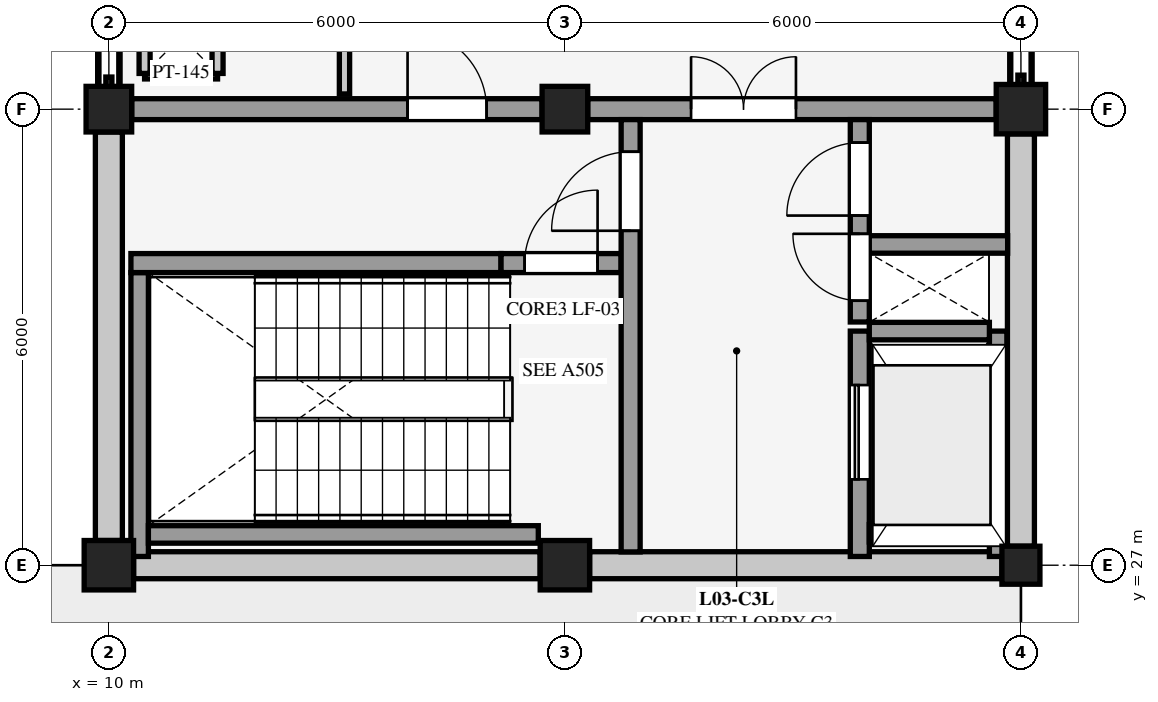
"""IFC4 building model, lengths in metres.
Left out: names, types, materials, properties, quantities, classifications, styles, units other than length and angle.
Written with IfcOpenShell. Run it as: python <this file> out.ifc"""

import sys

from ifc_helpers import new_model, si_unit, direction, frame, frame_2d, origin, origin_2d, place, context, subcontext, project, spatial, rectangle, extrude, element, fill, save


model = new_model("IFC4")
c1 = context("Model", 3, precision=1e-05, world=origin(), true_north=direction((0.0, 1.0)))
c2 = subcontext(c1, "Body", "Model", "MODEL_VIEW")
j1 = project(units=[si_unit("LENGTHUNIT", "METRE"), si_unit("PLANEANGLEUNIT", "RADIAN")], contexts=[c1])
p1 = place(None, origin())
s1 = spatial("IfcSite", under=j1, at=p1, CompositionType="ELEMENT")
p2 = place(p1, origin())
s2 = spatial("IfcBuilding", under=s1, at=p2, CompositionType="ELEMENT")
p3 = place(p2, frame((0.0, 0.0, 9.0)))
s3 = spatial("IfcBuildingStorey", under=s2, at=p3, CompositionType="ELEMENT", Elevation=9.0)
p4 = place(p3, frame((10.0, 27.0, 0.0), z_axis=(0.0, 0.0, 1.0), x_axis=(1.0, 0.0, 0.0)))
e1 = element("IfcColumn", 1, at=p4, inside=s3, PredefinedType="COLUMN", context=c2, shape_type="SweptSolid", body=[
    extrude(rectangle(XDim=0.65, YDim=0.65, at=origin_2d()), origin(), (0.0, 0.0, 1.0), 4.5),
])
p5 = place(p3, frame((10.0, 33.0, 0.0), z_axis=(0.0, 0.0, 1.0), x_axis=(1.0, 0.0, 0.0)))
e2 = element("IfcColumn", 2, at=p5, inside=s3, PredefinedType="COLUMN", context=c2, shape_type="SweptSolid", body=[
    extrude(rectangle(XDim=0.6, YDim=0.6, at=origin_2d()), origin(), (0.0, 0.0, 1.0), 4.5),
])
p6 = place(p3, frame((16.0, 27.0, 0.0), z_axis=(0.0, 0.0, 1.0), x_axis=(1.0, 0.0, 0.0)))
e3 = element("IfcColumn", 3, at=p6, inside=s3, PredefinedType="COLUMN", context=c2, shape_type="SweptSolid", body=[
    extrude(rectangle(XDim=0.65, YDim=0.65, at=origin_2d()), origin(), (0.0, 0.0, 1.0), 4.5),
])
p7 = place(p3, frame((16.0, 33.0, 0.0), z_axis=(0.0, 0.0, 1.0), x_axis=(1.0, 0.0, 0.0)))
e4 = element("IfcColumn", 4, at=p7, inside=s3, PredefinedType="COLUMN", context=c2, shape_type="SweptSolid", body=[
    extrude(rectangle(XDim=0.6, YDim=0.6, at=origin_2d()), origin(), (0.0, 0.0, 1.0), 4.5),
])
p8 = place(p3, frame((22.0, 27.0, 0.0), z_axis=(0.0, 0.0, 1.0), x_axis=(1.0, 0.0, 0.0)))
e5 = element("IfcColumn", 5, at=p8, inside=s3, PredefinedType="COLUMN", context=c2, shape_type="SweptSolid", body=[
    extrude(rectangle(XDim=0.5, YDim=0.5, at=origin_2d()), origin(), (0.0, 0.0, 1.0), 4.5),
])
p9 = place(p3, frame((22.0, 33.0, 0.0), z_axis=(0.0, 0.0, 1.0), x_axis=(1.0, 0.0, 0.0)))
e6 = element("IfcColumn", 6, at=p9, inside=s3, PredefinedType="COLUMN", context=c2, shape_type="SweptSolid", body=[
    extrude(rectangle(XDim=0.65, YDim=0.65, at=origin_2d()), origin(), (0.0, 0.0, 1.0), 4.5),
])
p10 = place(p3, frame((15.675, 27.0, 0.0), z_axis=(0.0, 0.0, 1.0), x_axis=(-1.0, 0.0, 0.0)))
e7 = element("IfcWall", 7, at=p10, inside=s3, PredefinedType="SOLIDWALL", context=c2, shape_type="SweptSolid", body=[
    extrude(rectangle(XDim=5.35, YDim=0.355, at=frame_2d((2.675, 0.0))), origin(), (0.0, 0.0, 1.0), 4.034),
])
p11 = place(p3, frame((21.75, 27.0, 0.0), z_axis=(0.0, 0.0, 1.0), x_axis=(-1.0, 0.0, 0.0)))
e8 = element("IfcWall", 8, at=p11, inside=s3, PredefinedType="SOLIDWALL", context=c2, shape_type="SweptSolid", body=[
    extrude(rectangle(XDim=5.425, YDim=0.355, at=frame_2d((2.712, 0.0))), origin(), (0.0, 0.0, 1.0), 4.048),
])
p12 = place(p3, frame((10.0, 27.325, 0.0), z_axis=(0.0, 0.0, 1.0), x_axis=(0.0, 1.0, 0.0)))
e9 = element("IfcWall", 9, at=p12, inside=s3, PredefinedType="SOLIDWALL", context=c2, shape_type="SweptSolid", body=[
    extrude(rectangle(XDim=5.375, YDim=0.355, at=frame_2d((2.688, 0.0))), origin(), (0.0, 0.0, 1.0), 3.893),
])
p13 = place(p3, frame((22.0, 32.675, 0.0), z_axis=(0.0, 0.0, 1.0), x_axis=(0.0, -1.0, 0.0)))
e10 = element("IfcWall", 10, at=p13, inside=s3, PredefinedType="SOLIDWALL", context=c2, shape_type="SweptSolid", body=[
    extrude(rectangle(XDim=5.425, YDim=0.355, at=frame_2d((2.712, 0.0))), origin(), (0.0, 0.0, 1.0), 3.893),
])
p14 = place(p3, frame((10.0, 33.3, 0.0), z_axis=(0.0, 0.0, 1.0), x_axis=(0.0, 1.0, 0.0)))
e11 = element("IfcWall", 11, at=p14, inside=s3, PredefinedType="SOLIDWALL", context=c2, shape_type="SweptSolid", body=[
    extrude(rectangle(XDim=5.425, YDim=0.295, at=frame_2d((2.712, 0.0))), origin(), (0.0, 0.0, 1.0), 0.31),
])
p15 = place(p3, frame((22.0, 38.7, 0.0), z_axis=(0.0, 0.0, 1.0), x_axis=(0.0, -1.0, 0.0)))
e12 = element("IfcWall", 12, at=p15, inside=s3, PredefinedType="SOLIDWALL", context=c2, shape_type="SweptSolid", body=[
    extrude(rectangle(XDim=5.375, YDim=0.295, at=frame_2d((2.688, 0.0))), origin(), (0.0, 0.0, 1.0), 0.36),
])
for number, where, z_axis, x_axis in (
    (13, (10.47, 33.47, 0.0), (0.0, 0.0, 1.0), (1.0, 0.0, 0.0)),
    (14, (11.43, 33.47, 0.0), (0.0, 0.0, 1.0), (0.0, 1.0, 0.0)),
    (15, (10.47, 34.43, 0.0), (0.0, 0.0, 1.0), (0.0, -1.0, 0.0)),
):
    element("IfcWall", number, at=place(p3, frame(where, z_axis=z_axis, x_axis=x_axis)), inside=s3, PredefinedType="PARTITIONING", context=c2, shape_type="SweptSolid", body=[
        extrude(rectangle(XDim=0.96, YDim=0.145, at=frame_2d((0.48, 0.0))), origin(), (0.0, 0.0, 1.0), 4.3),
    ])
p16 = place(p3, frame((10.3, 33.0, 0.0), z_axis=(0.0, 0.0, 1.0), x_axis=(1.0, 0.0, 0.0)))
e16 = element("IfcWall", 16, at=p16, inside=s3, PredefinedType="SHEAR", context=c2, shape_type="SweptSolid", body=[
    extrude(rectangle(XDim=5.4, YDim=0.275, at=frame_2d((2.7, 0.0))), origin(), (0.0, 0.0, 1.0), 4.3),
])
p17 = place(p16, frame((3.63, 0.0, 0.0)))
e17 = element("IfcOpeningElement", 17, at=p17, cuts=e16, PredefinedType="OPENING", context=c2, shape_type="SweptSolid", body=[
    extrude(rectangle(XDim=1.04, YDim=2.14, at=frame_2d((0.52, 1.07))), frame((0.0, 0.147, 0.0), z_axis=(0.0, -1.0, 0.0), x_axis=(1.0, 0.0, 0.0)), (0.0, 0.0, 1.0), 0.295),
])
p18 = place(p3, frame((16.3, 33.0, 0.0), z_axis=(0.0, 0.0, 1.0), x_axis=(1.0, 0.0, 0.0)))
e18 = element("IfcWall", 18, at=p18, inside=s3, PredefinedType="SHEAR", context=c2, shape_type="SweptSolid", body=[
    extrude(rectangle(XDim=5.375, YDim=0.275, at=frame_2d((2.688, 0.0))), origin(), (0.0, 0.0, 1.0), 4.3),
])
p19 = place(p18, frame((1.36, 0.0, 0.0)))
e19 = element("IfcOpeningElement", 19, at=p19, cuts=e18, PredefinedType="OPENING", context=c2, shape_type="SweptSolid", body=[
    extrude(rectangle(XDim=1.38, YDim=2.16, at=frame_2d((0.69, 1.08))), frame((0.0, 0.147, 0.0), z_axis=(0.0, -1.0, 0.0), x_axis=(1.0, 0.0, 0.0)), (0.0, 0.0, 1.0), 0.295),
])
p20 = place(p3, frame((10.405, 27.115, 0.0), z_axis=(0.0, 0.0, 1.0), x_axis=(0.0, 1.0, 0.0)))
e20 = element("IfcWall", 20, at=p20, inside=s3, PredefinedType="SHEAR", context=c2, shape_type="SweptSolid", body=[
    extrude(rectangle(XDim=3.735, YDim=0.23, at=frame_2d((1.868, 0.0))), origin(), (0.0, 0.0, 1.0), 4.5),
])
p21 = place(p3, frame((10.52, 27.405, 0.0), z_axis=(0.0, 0.0, 1.0), x_axis=(1.0, 0.0, 0.0)))
e21 = element("IfcWall", 21, at=p21, inside=s3, PredefinedType="SHEAR", context=c2, shape_type="SweptSolid", body=[
    extrude(rectangle(XDim=5.13, YDim=0.23, at=frame_2d((2.565, 0.0))), origin(), (0.0, 0.0, 1.0), 4.5),
])
p22 = place(p3, frame((10.29, 30.975, 0.0), z_axis=(0.0, 0.0, 1.0), x_axis=(1.0, 0.0, 0.0)))
e22 = element("IfcWall", 22, at=p22, inside=s3, PredefinedType="SHEAR", context=c2, shape_type="SweptSolid", body=[
    extrude(rectangle(XDim=4.87, YDim=0.25, at=frame_2d((2.435, 0.0))), origin(), (0.0, 0.0, 1.0), 4.5),
])
p23 = place(p3, frame((15.16, 30.975, 0.0), z_axis=(0.0, 0.0, 1.0), x_axis=(1.0, 0.0, 0.0)))
e23 = element("IfcWall", 23, at=p23, inside=s3, PredefinedType="SHEAR", context=c2, shape_type="SweptSolid", body=[
    extrude(rectangle(XDim=1.58, YDim=0.25, at=frame_2d((0.79, 0.0))), origin(), (0.0, 0.0, 1.0), 4.3),
])
p24 = place(p23, frame((0.31, 0.0, 0.0)))
e24 = element("IfcOpeningElement", 24, at=p24, cuts=e23, PredefinedType="OPENING", context=c2, shape_type="SweptSolid", body=[
    extrude(rectangle(XDim=0.96, YDim=2.12, at=frame_2d((0.48, 1.06))), frame((0.0, 0.135, 0.0), z_axis=(0.0, -1.0, 0.0), x_axis=(1.0, 0.0, 0.0)), (0.0, 0.0, 1.0), 0.27),
])
p25 = place(p3, frame((16.865, 27.175, 0.0), z_axis=(0.0, 0.0, 1.0), x_axis=(0.0, 1.0, 0.0)))
e25 = element("IfcWall", 25, at=p25, inside=s3, PredefinedType="SHEAR", context=c2, shape_type="SweptSolid", body=[
    extrude(rectangle(XDim=5.688, YDim=0.25, at=frame_2d((2.844, 0.0))), origin(), (0.0, 0.0, 1.0), 4.3),
])
p26 = place(p25, frame((4.225, 0.0, 0.0)))
e26 = element("IfcOpeningElement", 26, at=p26, cuts=e25, PredefinedType="OPENING", context=c2, shape_type="SweptSolid", body=[
    extrude(rectangle(XDim=1.04, YDim=2.14, at=frame_2d((0.52, 1.07))), frame((0.0, 0.135, 0.0), z_axis=(0.0, -1.0, 0.0), x_axis=(1.0, 0.0, 0.0)), (0.0, 0.0, 1.0), 0.27),
])
p27 = place(p3, frame((19.88, 27.115, 0.0), z_axis=(0.0, 0.0, 1.0), x_axis=(0.0, 1.0, 0.0)))
e27 = element("IfcWall", 27, at=p27, inside=s3, PredefinedType="SHEAR", context=c2, shape_type="SweptSolid", body=[
    extrude(rectangle(XDim=2.965, YDim=0.25, at=frame_2d((1.482, 0.0))), origin(), (0.0, 0.0, 1.0), 4.5),
])
p28 = place(p27, frame((1.015, 0.0, 0.0)))
e28 = element("IfcOpeningElement", 28, at=p28, cuts=e27, PredefinedType="OPENING", context=c2, shape_type="SweptSolid", body=[
    extrude(rectangle(XDim=1.24, YDim=2.2, at=frame_2d((0.62, 1.1))), frame((0.0, 0.135, 0.0), z_axis=(0.0, -1.0, 0.0), x_axis=(1.0, 0.0, 0.0)), (0.0, 0.0, 1.0), 0.27),
])
p29 = place(p3, frame((20.005, 27.42, 0.0), z_axis=(0.0, 0.0, 1.0), x_axis=(1.0, 0.0, 0.0)))
e29 = element("IfcWall", 29, at=p29, inside=s3, PredefinedType="SHEAR", context=c2, shape_type="SweptSolid", body=[
    extrude(rectangle(XDim=1.58, YDim=0.23, at=frame_2d((0.79, 0.0))), origin(), (0.0, 0.0, 1.0), 4.5),
])
p30 = place(p3, frame((21.7, 27.115, 0.0), z_axis=(0.0, 0.0, 1.0), x_axis=(0.0, 1.0, 0.0)))
e30 = element("IfcWall", 30, at=p30, inside=s3, PredefinedType="SHEAR", context=c2, shape_type="SweptSolid", body=[
    extrude(rectangle(XDim=2.965, YDim=0.23, at=frame_2d((1.482, 0.0))), origin(), (0.0, 0.0, 1.0), 4.5),
])
p31 = place(p3, frame((20.005, 30.08, 0.0), z_axis=(0.0, 0.0, 1.0), x_axis=(1.0, 0.0, 0.0)))
e31 = element("IfcWall", 31, at=p31, inside=s3, PredefinedType="SHEAR", context=c2, shape_type="SweptSolid", body=[
    extrude(rectangle(XDim=1.58, YDim=0.23, at=frame_2d((0.79, 0.0))), origin(), (0.0, 0.0, 1.0), 4.5),
])
p32 = place(p3, frame((19.88, 30.2, 0.0), z_axis=(0.0, 0.0, 1.0), x_axis=(0.0, 1.0, 0.0)))
e32 = element("IfcWall", 32, at=p32, inside=s3, PredefinedType="SHEAR", context=c2, shape_type="SweptSolid", body=[
    extrude(rectangle(XDim=2.663, YDim=0.25, at=frame_2d((1.331, 0.0))), origin(), (0.0, 0.0, 1.0), 4.3),
])
p33 = place(p32, frame((0.28, 0.0, 0.0)))
e33 = element("IfcOpeningElement", 33, at=p33, cuts=e32, PredefinedType="OPENING", context=c2, shape_type="SweptSolid", body=[
    extrude(rectangle(XDim=0.88, YDim=2.08, at=frame_2d((0.44, 1.04))), frame((0.0, 0.135, 0.0), z_axis=(0.0, -1.0, 0.0), x_axis=(1.0, 0.0, 0.0)), (0.0, 0.0, 1.0), 0.27),
])
p34 = place(p32, frame((1.4, 0.0, 0.0)))
e34 = element("IfcOpeningElement", 34, at=p34, cuts=e32, PredefinedType="OPENING", context=c2, shape_type="SweptSolid", body=[
    extrude(rectangle(XDim=0.96, YDim=2.12, at=frame_2d((0.48, 1.06))), frame((0.0, 0.135, 0.0), z_axis=(0.0, -1.0, 0.0), x_axis=(1.0, 0.0, 0.0)), (0.0, 0.0, 1.0), 0.27),
])
p35 = place(p3, frame((20.005, 31.22, 0.0), z_axis=(0.0, 0.0, 1.0), x_axis=(1.0, 0.0, 0.0)))
e35 = element("IfcWall", 35, at=p35, inside=s3, PredefinedType="SHEAR", context=c2, shape_type="SweptSolid", body=[
    extrude(rectangle(XDim=1.82, YDim=0.23, at=frame_2d((0.91, 0.0))), origin(), (0.0, 0.0, 1.0), 4.3),
])
p36 = place(p3, frame((13.1, 33.2, 0.0), z_axis=(0.0, 0.0, 1.0), x_axis=(0.0, 1.0, 0.0)))
e36 = element("IfcWall", 36, at=p36, inside=s3, PredefinedType="PARTITIONING", context=c2, shape_type="SweptSolid", body=[
    extrude(rectangle(XDim=11.688, YDim=0.135, at=frame_2d((5.844, 0.0))), origin(), (0.0, 0.0, 1.0), 4.3),
])
p37 = place(p36, frame((5.074, 0.0, 0.0)))
e37 = element("IfcOpeningElement", 37, at=p37, cuts=e36, PredefinedType="OPENING", context=c2, shape_type="SweptSolid", body=[
    extrude(rectangle(XDim=1.54, YDim=2.26, at=frame_2d((0.77, 1.13))), frame((0.0, 0.077, 0.0), z_axis=(0.0, -1.0, 0.0), x_axis=(1.0, 0.0, 0.0)), (0.0, 0.0, 1.0), 0.155),
])
p38 = place(p17, origin())
e38 = element("IfcDoor", 38, at=p38, inside=s3, OperationType="SINGLE_SWING_LEFT", PredefinedType="DOOR", context=c2, shape_type="SweptSolid", body=[
    extrude(rectangle(XDim=1.04, YDim=2.14, at=frame_2d((0.52, 1.07))), frame((0.0, 0.025, 0.0), z_axis=(0.0, -1.0, 0.0), x_axis=(1.0, 0.0, 0.0)), (0.0, 0.0, 1.0), 0.05),
])
fill(e17, e38)
p39 = place(p19, origin())
e39 = element("IfcDoor", 39, at=p39, inside=s3, OperationType="DOUBLE_DOOR_SINGLE_SWING", PredefinedType="DOOR", context=c2, shape_type="SweptSolid", body=[
    extrude(rectangle(XDim=1.38, YDim=2.16, at=frame_2d((0.69, 1.08))), frame((0.0, 0.025, 0.0), z_axis=(0.0, -1.0, 0.0), x_axis=(1.0, 0.0, 0.0)), (0.0, 0.0, 1.0), 0.05),
])
fill(e19, e39)
p40 = place(p24, origin())
e40 = element("IfcDoor", 40, at=p40, inside=s3, OperationType="SINGLE_SWING_RIGHT", PredefinedType="DOOR", context=c2, shape_type="SweptSolid", body=[
    extrude(rectangle(XDim=0.96, YDim=2.12, at=frame_2d((0.48, 1.06))), frame((0.0, 0.025, 0.0), z_axis=(0.0, -1.0, 0.0), x_axis=(1.0, 0.0, 0.0)), (0.0, 0.0, 1.0), 0.05),
])
fill(e24, e40)
p41 = place(p26, origin())
e41 = element("IfcDoor", 41, at=p41, inside=s3, OperationType="SINGLE_SWING_LEFT", PredefinedType="DOOR", context=c2, shape_type="SweptSolid", body=[
    extrude(rectangle(XDim=1.04, YDim=2.14, at=frame_2d((0.52, 1.07))), frame((0.0, 0.025, 0.0), z_axis=(0.0, -1.0, 0.0), x_axis=(1.0, 0.0, 0.0)), (0.0, 0.0, 1.0), 0.05),
])
fill(e26, e41)
p42 = place(p28, origin())
e42 = element("IfcDoor", 42, at=p42, inside=s3, OperationType="SLIDING_TO_LEFT", PredefinedType="DOOR", context=c2, shape_type="SweptSolid", body=[
    extrude(rectangle(XDim=1.24, YDim=2.2, at=frame_2d((0.62, 1.1))), frame((0.0, 0.025, 0.0), z_axis=(0.0, -1.0, 0.0), x_axis=(1.0, 0.0, 0.0)), (0.0, 0.0, 1.0), 0.05),
])
fill(e28, e42)
p43 = place(p33, origin())
e43 = element("IfcDoor", 43, at=p43, inside=s3, OperationType="SINGLE_SWING_RIGHT", PredefinedType="DOOR", context=c2, shape_type="SweptSolid", body=[
    extrude(rectangle(XDim=0.88, YDim=2.08, at=frame_2d((0.44, 1.04))), frame((0.0, 0.025, 0.0), z_axis=(0.0, -1.0, 0.0), x_axis=(1.0, 0.0, 0.0)), (0.0, 0.0, 1.0), 0.05),
])
fill(e33, e43)
p44 = place(p34, origin())
e44 = element("IfcDoor", 44, at=p44, inside=s3, OperationType="SINGLE_SWING_LEFT", PredefinedType="DOOR", context=c2, shape_type="SweptSolid", body=[
    extrude(rectangle(XDim=0.96, YDim=2.12, at=frame_2d((0.48, 1.06))), frame((0.0, 0.025, 0.0), z_axis=(0.0, -1.0, 0.0), x_axis=(1.0, 0.0, 0.0)), (0.0, 0.0, 1.0), 0.05),
])
fill(e34, e44)
save(model, sys.argv[1])
